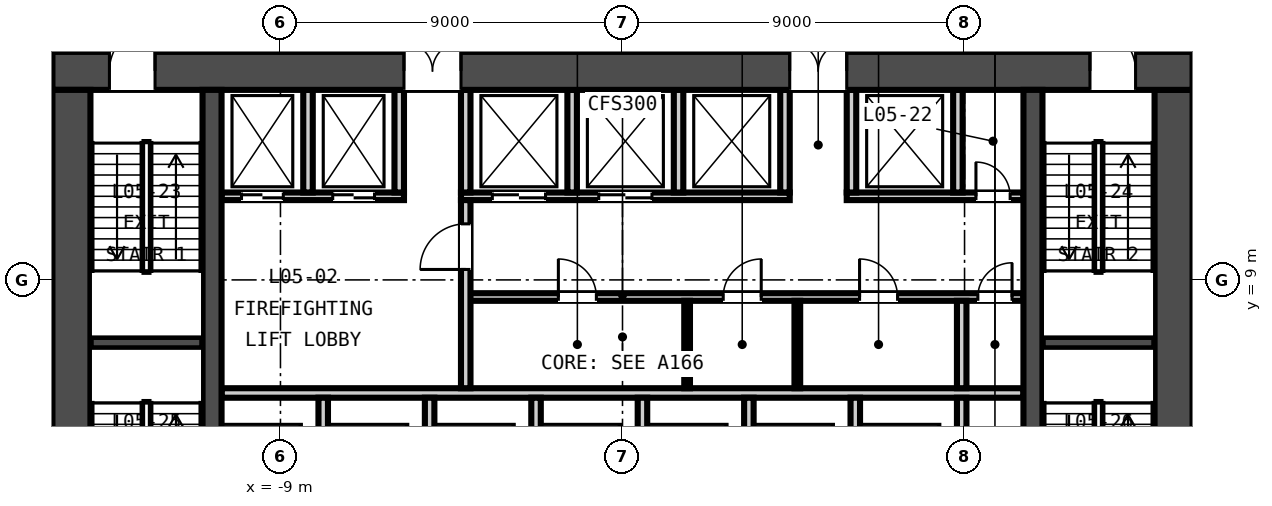
"""IFC4 building model, lengths in metres.
Left out: names, types, materials, properties, quantities, classifications, styles, units other than length and angle.
Written with IfcOpenShell. Run it as: python <this file> out.ifc"""

import sys

from ifc_helpers import new_model, si_unit, direction, frame, frame_2d, origin, place, context, subcontext, project, spatial, rectangle, extrude, element, fill, save


model = new_model("IFC4")
c1 = context("Model", 3, precision=1e-05, world=origin(), true_north=direction((0.0, 1.0)))
c2 = subcontext(c1, "Body", "Model", "MODEL_VIEW")
j1 = project(units=[si_unit("LENGTHUNIT", "METRE"), si_unit("PLANEANGLEUNIT", "RADIAN")], contexts=[c1])
p1 = place(None, origin())
s1 = spatial("IfcSite", under=j1, at=p1, CompositionType="ELEMENT")
p2 = place(p1, origin())
s2 = spatial("IfcBuilding", under=s1, at=p2, CompositionType="ELEMENT")
p3 = place(p2, frame((0.0, 0.0, 31.5)))
s3 = spatial("IfcBuildingStorey", under=s2, at=p3, CompositionType="ELEMENT", Elevation=31.5)
p4 = place(p3, frame((-15.0, 14.5, -0.3), z_axis=(0.0, 0.0, 1.0), x_axis=(1.0, 0.0, 0.0)))
e1 = element("IfcWall", 1, at=p4, inside=s3, PredefinedType="SOLIDWALL", context=c2, shape_type="SweptSolid", body=[
    extrude(rectangle(XDim=30.0, YDim=1.0, at=frame_2d((15.0, 0.0))), origin(), (0.0, 0.0, 1.0), 4.65),
])
p5 = place(p4, frame((9.25, 0.0, 0.3)))
e2 = element("IfcOpeningElement", 2, at=p5, cuts=e1, PredefinedType="OPENING", context=c2, shape_type="SweptSolid", body=[
    extrude(rectangle(XDim=1.5, YDim=2.1, at=frame_2d((0.75, 1.05))), frame((0.0, 0.51, 0.0), z_axis=(0.0, -1.0, 0.0), x_axis=(1.0, 0.0, 0.0)), (0.0, 0.0, 1.0), 1.02),
])
p6 = place(p4, frame((19.4, 0.0, 0.3)))
e3 = element("IfcOpeningElement", 3, at=p6, cuts=e1, PredefinedType="OPENING", context=c2, shape_type="SweptSolid", body=[
    extrude(rectangle(XDim=1.5, YDim=2.1, at=frame_2d((0.75, 1.05))), frame((0.0, 0.51, 0.0), z_axis=(0.0, -1.0, 0.0), x_axis=(1.0, 0.0, 0.0)), (0.0, 0.0, 1.0), 1.02),
])
p7 = place(p4, frame((1.5, 0.0, 0.3)))
e4 = element("IfcOpeningElement", 4, at=p7, cuts=e1, PredefinedType="OPENING", context=c2, shape_type="SweptSolid", body=[
    extrude(rectangle(XDim=1.2, YDim=2.1, at=frame_2d((0.6, 1.05))), frame((0.0, 0.51, 0.0), z_axis=(0.0, -1.0, 0.0), x_axis=(1.0, 0.0, 0.0)), (0.0, 0.0, 1.0), 1.02),
])
p8 = place(p4, frame((27.3, 0.0, 0.3)))
e5 = element("IfcOpeningElement", 5, at=p8, cuts=e1, PredefinedType="OPENING", context=c2, shape_type="SweptSolid", body=[
    extrude(rectangle(XDim=1.2, YDim=2.1, at=frame_2d((0.6, 1.05))), frame((0.0, 0.51, 0.0), z_axis=(0.0, -1.0, 0.0), x_axis=(1.0, 0.0, 0.0)), (0.0, 0.0, 1.0), 1.02),
])
for number, where, z_axis, x_axis in (
    (6, (-14.5, 1.0, -0.3), (0.0, 0.0, 1.0), (0.0, 1.0, 0.0)),
    (7, (14.5, 1.0, -0.3), (0.0, 0.0, 1.0), (0.0, 1.0, 0.0)),
):
    element("IfcWall", number, at=place(p3, frame(where, z_axis=z_axis, x_axis=x_axis)), inside=s3, PredefinedType="SOLIDWALL", context=c2, shape_type="SweptSolid", body=[
        extrude(rectangle(XDim=13.0, YDim=1.0, at=frame_2d((6.5, 0.0))), origin(), (0.0, 0.0, 1.0), 4.65),
    ])
for number, where, z_axis, x_axis in (
    (8, (-10.8, 1.0, -0.3), (0.0, 0.0, 1.0), (0.0, 1.0, 0.0)),
    (9, (10.8, 1.0, -0.3), (0.0, 0.0, 1.0), (0.0, 1.0, 0.0)),
):
    element("IfcWall", number, at=place(p3, frame(where, z_axis=z_axis, x_axis=x_axis)), inside=s3, PredefinedType="SOLIDWALL", context=c2, shape_type="SweptSolid", body=[
        extrude(rectangle(XDim=13.0, YDim=0.5, at=frame_2d((6.5, 0.0))), origin(), (0.0, 0.0, 1.0), 4.65),
    ])
p9 = place(p3, frame((-10.55, 6.025, 0.0), z_axis=(0.0, 0.0, 1.0), x_axis=(1.0, 0.0, 0.0)))
e10 = element("IfcWall", 10, at=p9, inside=s3, PredefinedType="PARTITIONING", context=c2, shape_type="SweptSolid", body=[
    extrude(rectangle(XDim=21.1, YDim=0.25, at=frame_2d((10.55, 0.0))), origin(), (0.0, 0.0, 1.0), 4.35),
])
p10 = place(p3, frame((-4.125, 8.55, 0.0), z_axis=(0.0, 0.0, 1.0), x_axis=(1.0, 0.0, 0.0)))
e11 = element("IfcWall", 11, at=p10, inside=s3, PredefinedType="PARTITIONING", context=c2, shape_type="SweptSolid", body=[
    extrude(rectangle(XDim=14.675, YDim=0.2, at=frame_2d((7.337, 0.0))), origin(), (0.0, 0.0, 1.0), 4.35),
])
p11 = place(p10, frame((2.438, 0.0, 0.0)))
e12 = element("IfcOpeningElement", 12, at=p11, cuts=e11, PredefinedType="OPENING", context=c2, shape_type="SweptSolid", body=[
    extrude(rectangle(XDim=1.0, YDim=2.1, at=frame_2d((0.5, 1.05))), frame((0.0, 0.11, 0.0), z_axis=(0.0, -1.0, 0.0), x_axis=(1.0, 0.0, 0.0)), (0.0, 0.0, 1.0), 0.22),
])
p12 = place(p10, frame((6.775, 0.0, 0.0)))
e13 = element("IfcOpeningElement", 13, at=p12, cuts=e11, PredefinedType="OPENING", context=c2, shape_type="SweptSolid", body=[
    extrude(rectangle(XDim=1.0, YDim=2.1, at=frame_2d((0.5, 1.05))), frame((0.0, 0.11, 0.0), z_axis=(0.0, -1.0, 0.0), x_axis=(1.0, 0.0, 0.0)), (0.0, 0.0, 1.0), 0.22),
])
p13 = place(p10, frame((10.363, 0.0, 0.0)))
e14 = element("IfcOpeningElement", 14, at=p13, cuts=e11, PredefinedType="OPENING", context=c2, shape_type="SweptSolid", body=[
    extrude(rectangle(XDim=1.0, YDim=2.1, at=frame_2d((0.5, 1.05))), frame((0.0, 0.11, 0.0), z_axis=(0.0, -1.0, 0.0), x_axis=(1.0, 0.0, 0.0)), (0.0, 0.0, 1.0), 0.22),
])
p14 = place(p10, frame((13.475, 0.0, 0.0)))
e15 = element("IfcOpeningElement", 15, at=p14, cuts=e11, PredefinedType="OPENING", context=c2, shape_type="SweptSolid", body=[
    extrude(rectangle(XDim=0.9, YDim=2.1, at=frame_2d((0.45, 1.05))), frame((0.0, 0.11, 0.0), z_axis=(0.0, -1.0, 0.0), x_axis=(1.0, 0.0, 0.0)), (0.0, 0.0, 1.0), 0.22),
])
p15 = place(p3, frame((-10.55, 11.2, 0.0), z_axis=(0.0, 0.0, 1.0), x_axis=(1.0, 0.0, 0.0)))
e16 = element("IfcWall", 16, at=p15, inside=s3, PredefinedType="PARTITIONING", context=c2, shape_type="SweptSolid", body=[
    extrude(rectangle(XDim=4.8, YDim=0.2, at=frame_2d((2.4, 0.0))), origin(), (0.0, 0.0, 1.0), 4.35),
])
p16 = place(p15, frame((0.525, 0.0, 0.0)))
e17 = element("IfcOpeningElement", 17, at=p16, cuts=e16, PredefinedType="OPENING", context=c2, shape_type="SweptSolid", body=[
    extrude(rectangle(XDim=1.1, YDim=2.1, at=frame_2d((0.55, 1.05))), frame((0.0, 0.11, 0.0), z_axis=(0.0, -1.0, 0.0), x_axis=(1.0, 0.0, 0.0)), (0.0, 0.0, 1.0), 0.22),
])
p17 = place(p15, frame((2.925, 0.0, 0.0)))
e18 = element("IfcOpeningElement", 18, at=p17, cuts=e16, PredefinedType="OPENING", context=c2, shape_type="SweptSolid", body=[
    extrude(rectangle(XDim=1.1, YDim=2.1, at=frame_2d((0.55, 1.05))), frame((0.0, 0.11, 0.0), z_axis=(0.0, -1.0, 0.0), x_axis=(1.0, 0.0, 0.0)), (0.0, 0.0, 1.0), 0.22),
])
p18 = place(p3, frame((-4.25, 11.2, 0.0), z_axis=(0.0, 0.0, 1.0), x_axis=(1.0, 0.0, 0.0)))
e19 = element("IfcWall", 19, at=p18, inside=s3, PredefinedType="PARTITIONING", context=c2, shape_type="SweptSolid", body=[
    extrude(rectangle(XDim=8.65, YDim=0.2, at=frame_2d((4.325, 0.0))), origin(), (0.0, 0.0, 1.0), 4.35),
])
p19 = place(p18, frame((0.825, 0.0, 0.0)))
e20 = element("IfcOpeningElement", 20, at=p19, cuts=e19, PredefinedType="OPENING", context=c2, shape_type="SweptSolid", body=[
    extrude(rectangle(XDim=1.4, YDim=2.1, at=frame_2d((0.7, 1.05))), frame((0.0, 0.11, 0.0), z_axis=(0.0, -1.0, 0.0), x_axis=(1.0, 0.0, 0.0)), (0.0, 0.0, 1.0), 0.22),
])
p20 = place(p18, frame((3.625, 0.0, 0.0)))
e21 = element("IfcOpeningElement", 21, at=p20, cuts=e19, PredefinedType="OPENING", context=c2, shape_type="SweptSolid", body=[
    extrude(rectangle(XDim=1.4, YDim=2.1, at=frame_2d((0.7, 1.05))), frame((0.0, 0.11, 0.0), z_axis=(0.0, -1.0, 0.0), x_axis=(1.0, 0.0, 0.0)), (0.0, 0.0, 1.0), 0.22),
])
p21 = place(p3, frame((5.9, 11.2, 0.0), z_axis=(0.0, 0.0, 1.0), x_axis=(1.0, 0.0, 0.0)))
e22 = element("IfcWall", 22, at=p21, inside=s3, PredefinedType="PARTITIONING", context=c2, shape_type="SweptSolid", body=[
    extrude(rectangle(XDim=4.65, YDim=0.2, at=frame_2d((2.325, 0.0))), origin(), (0.0, 0.0, 1.0), 4.35),
])
p22 = place(p21, frame((3.4, 0.0, 0.0)))
e23 = element("IfcOpeningElement", 23, at=p22, cuts=e22, PredefinedType="OPENING", context=c2, shape_type="SweptSolid", body=[
    extrude(rectangle(XDim=0.9, YDim=2.1, at=frame_2d((0.45, 1.05))), frame((0.0, 0.11, 0.0), z_axis=(0.0, -1.0, 0.0), x_axis=(1.0, 0.0, 0.0)), (0.0, 0.0, 1.0), 0.22),
])
p23 = place(p3, frame((-4.125, 6.15, 0.0), z_axis=(0.0, 0.0, 1.0), x_axis=(0.0, 1.0, 0.0)))
e24 = element("IfcWall", 24, at=p23, inside=s3, PredefinedType="PARTITIONING", context=c2, shape_type="SweptSolid", body=[
    extrude(rectangle(XDim=4.95, YDim=0.25, at=frame_2d((2.475, 0.0))), origin(), (0.0, 0.0, 1.0), 4.35),
])
p24 = place(p23, frame((3.125, 0.0, 0.0)))
e25 = element("IfcOpeningElement", 25, at=p24, cuts=e24, PredefinedType="OPENING", context=c2, shape_type="SweptSolid", body=[
    extrude(rectangle(XDim=1.2, YDim=2.1, at=frame_2d((0.6, 1.05))), frame((0.0, 0.135, 0.0), z_axis=(0.0, -1.0, 0.0), x_axis=(1.0, 0.0, 0.0)), (0.0, 0.0, 1.0), 0.27),
])
for number, where, z_axis, x_axis in (
    (26, (-7.875, 3.6, 0.0), (0.0, 0.0, 1.0), (0.0, 1.0, 0.0)),
    (27, (-5.075, 3.6, 0.0), (0.0, 0.0, 1.0), (0.0, 1.0, 0.0)),
    (28, (-2.275, 3.6, 0.0), (0.0, 0.0, 1.0), (0.0, 1.0, 0.0)),
    (29, (0.525, 3.6, 0.0), (0.0, 0.0, 1.0), (0.0, 1.0, 0.0)),
    (30, (3.325, 3.6, 0.0), (0.0, 0.0, 1.0), (0.0, 1.0, 0.0)),
    (31, (6.125, 3.6, 0.0), (0.0, 0.0, 1.0), (0.0, 1.0, 0.0)),
    (32, (8.925, 3.6, 0.0), (0.0, 0.0, 1.0), (0.0, 1.0, 0.0)),
):
    element("IfcWall", number, at=place(p3, frame(where, z_axis=z_axis, x_axis=x_axis)), inside=s3, PredefinedType="PARTITIONING", context=c2, shape_type="SweptSolid", body=[
        extrude(rectangle(XDim=2.3, YDim=0.25, at=frame_2d((1.15, 0.0))), origin(), (0.0, 0.0, 1.0), 4.35),
    ])
for number, where, z_axis, x_axis in (
    (33, (1.7, 6.15, 0.0), (0.0, 0.0, 1.0), (0.0, 1.0, 0.0)),
    (34, (4.6, 6.15, 0.0), (0.0, 0.0, 1.0), (0.0, 1.0, 0.0)),
):
    element("IfcWall", number, at=place(p3, frame(where, z_axis=z_axis, x_axis=x_axis)), inside=s3, PredefinedType="PARTITIONING", context=c2, shape_type="SweptSolid", body=[
        extrude(rectangle(XDim=2.3, YDim=0.15, at=frame_2d((1.15, 0.0))), origin(), (0.0, 0.0, 1.0), 4.35),
    ])
p25 = place(p3, frame((8.925, 6.15, 0.0), z_axis=(0.0, 0.0, 1.0), x_axis=(0.0, 1.0, 0.0)))
e35 = element("IfcWall", 35, at=p25, inside=s3, PredefinedType="PARTITIONING", context=c2, shape_type="SweptSolid", body=[
    extrude(rectangle(XDim=2.3, YDim=0.25, at=frame_2d((1.15, 0.0))), origin(), (0.0, 0.0, 1.0), 4.35),
])
for number, where, z_axis, x_axis in (
    (36, (-8.275, 11.3, 0.0), (0.0, 0.0, 1.0), (0.0, 1.0, 0.0)),
    (37, (-5.875, 11.3, 0.0), (0.0, 0.0, 1.0), (0.0, 1.0, 0.0)),
    (38, (-4.125, 11.3, 0.0), (0.0, 0.0, 1.0), (0.0, 1.0, 0.0)),
    (39, (-1.325, 11.3, 0.0), (0.0, 0.0, 1.0), (0.0, 1.0, 0.0)),
    (40, (1.475, 11.3, 0.0), (0.0, 0.0, 1.0), (0.0, 1.0, 0.0)),
    (41, (4.275, 11.3, 0.0), (0.0, 0.0, 1.0), (0.0, 1.0, 0.0)),
    (42, (6.025, 11.3, 0.0), (0.0, 0.0, 1.0), (0.0, 1.0, 0.0)),
    (43, (8.825, 11.3, 0.0), (0.0, 0.0, 1.0), (0.0, 1.0, 0.0)),
):
    element("IfcWall", number, at=place(p3, frame(where, z_axis=z_axis, x_axis=x_axis)), inside=s3, PredefinedType="PARTITIONING", context=c2, shape_type="SweptSolid", body=[
        extrude(rectangle(XDim=2.7, YDim=0.25, at=frame_2d((1.35, 0.0))), origin(), (0.0, 0.0, 1.0), 4.35),
    ])
for number, where, z_axis, x_axis in (
    (44, (-14.0, 7.35, -0.3), (0.0, 0.0, 1.0), (1.0, 0.0, 0.0)),
    (45, (11.05, 7.35, -0.3), (0.0, 0.0, 1.0), (1.0, 0.0, 0.0)),
):
    element("IfcWall", number, at=place(p3, frame(where, z_axis=z_axis, x_axis=x_axis)), inside=s3, PredefinedType="SOLIDWALL", context=c2, shape_type="SweptSolid", body=[
        extrude(rectangle(XDim=2.95, YDim=0.3, at=frame_2d((1.475, 0.0))), origin(), (0.0, 0.0, 1.0), 4.65),
    ])
p26 = place(p24, origin())
e46 = element("IfcDoor", 46, at=p26, inside=s3, OperationType="SINGLE_SWING_LEFT", PredefinedType="DOOR", context=c2, shape_type="SweptSolid", body=[
    extrude(rectangle(XDim=1.2, YDim=2.1, at=frame_2d((0.6, 1.05))), frame((0.0, 0.025, 0.0), z_axis=(0.0, -1.0, 0.0), x_axis=(1.0, 0.0, 0.0)), (0.0, 0.0, 1.0), 0.05),
])
fill(e25, e46)
p27 = place(p11, origin())
e47 = element("IfcDoor", 47, at=p27, inside=s3, OperationType="SINGLE_SWING_LEFT", PredefinedType="DOOR", context=c2, shape_type="SweptSolid", body=[
    extrude(rectangle(XDim=1.0, YDim=2.1, at=frame_2d((0.5, 1.05))), frame((0.0, 0.025, 0.0), z_axis=(0.0, -1.0, 0.0), x_axis=(1.0, 0.0, 0.0)), (0.0, 0.0, 1.0), 0.05),
])
fill(e12, e47)
p28 = place(p12, origin())
e48 = element("IfcDoor", 48, at=p28, inside=s3, OperationType="SINGLE_SWING_RIGHT", PredefinedType="DOOR", context=c2, shape_type="SweptSolid", body=[
    extrude(rectangle(XDim=1.0, YDim=2.1, at=frame_2d((0.5, 1.05))), frame((0.0, 0.025, 0.0), z_axis=(0.0, -1.0, 0.0), x_axis=(1.0, 0.0, 0.0)), (0.0, 0.0, 1.0), 0.05),
])
fill(e13, e48)
p29 = place(p13, origin())
e49 = element("IfcDoor", 49, at=p29, inside=s3, OperationType="SINGLE_SWING_LEFT", PredefinedType="DOOR", context=c2, shape_type="SweptSolid", body=[
    extrude(rectangle(XDim=1.0, YDim=2.1, at=frame_2d((0.5, 1.05))), frame((0.0, 0.025, 0.0), z_axis=(0.0, -1.0, 0.0), x_axis=(1.0, 0.0, 0.0)), (0.0, 0.0, 1.0), 0.05),
])
fill(e14, e49)
p30 = place(p14, origin())
e50 = element("IfcDoor", 50, at=p30, inside=s3, OperationType="SINGLE_SWING_RIGHT", PredefinedType="DOOR", context=c2, shape_type="SweptSolid", body=[
    extrude(rectangle(XDim=0.9, YDim=2.1, at=frame_2d((0.45, 1.05))), frame((0.0, 0.025, 0.0), z_axis=(0.0, -1.0, 0.0), x_axis=(1.0, 0.0, 0.0)), (0.0, 0.0, 1.0), 0.05),
])
fill(e15, e50)
p31 = place(p16, origin())
e51 = element("IfcDoor", 51, at=p31, inside=s3, OperationType="DOUBLE_DOOR_SLIDING", PredefinedType="DOOR", context=c2, shape_type="SweptSolid", body=[
    extrude(rectangle(XDim=1.1, YDim=2.1, at=frame_2d((0.55, 1.05))), frame((0.0, 0.025, 0.0), z_axis=(0.0, -1.0, 0.0), x_axis=(1.0, 0.0, 0.0)), (0.0, 0.0, 1.0), 0.05),
])
fill(e17, e51)
p32 = place(p17, origin())
e52 = element("IfcDoor", 52, at=p32, inside=s3, OperationType="DOUBLE_DOOR_SLIDING", PredefinedType="DOOR", context=c2, shape_type="SweptSolid", body=[
    extrude(rectangle(XDim=1.1, YDim=2.1, at=frame_2d((0.55, 1.05))), frame((0.0, 0.025, 0.0), z_axis=(0.0, -1.0, 0.0), x_axis=(1.0, 0.0, 0.0)), (0.0, 0.0, 1.0), 0.05),
])
fill(e18, e52)
p33 = place(p19, origin())
e53 = element("IfcDoor", 53, at=p33, inside=s3, OperationType="DOUBLE_DOOR_SLIDING", PredefinedType="DOOR", context=c2, shape_type="SweptSolid", body=[
    extrude(rectangle(XDim=1.4, YDim=2.1, at=frame_2d((0.7, 1.05))), frame((0.0, 0.025, 0.0), z_axis=(0.0, -1.0, 0.0), x_axis=(1.0, 0.0, 0.0)), (0.0, 0.0, 1.0), 0.05),
])
fill(e20, e53)
p34 = place(p20, origin())
e54 = element("IfcDoor", 54, at=p34, inside=s3, OperationType="DOUBLE_DOOR_SLIDING", PredefinedType="DOOR", context=c2, shape_type="SweptSolid", body=[
    extrude(rectangle(XDim=1.4, YDim=2.1, at=frame_2d((0.7, 1.05))), frame((0.0, 0.025, 0.0), z_axis=(0.0, -1.0, 0.0), x_axis=(1.0, 0.0, 0.0)), (0.0, 0.0, 1.0), 0.05),
])
fill(e21, e54)
p35 = place(p22, origin())
e55 = element("IfcDoor", 55, at=p35, inside=s3, OperationType="SINGLE_SWING_LEFT", PredefinedType="DOOR", context=c2, shape_type="SweptSolid", body=[
    extrude(rectangle(XDim=0.9, YDim=2.1, at=frame_2d((0.45, 1.05))), frame((0.0, 0.025, 0.0), z_axis=(0.0, -1.0, 0.0), x_axis=(1.0, 0.0, 0.0)), (0.0, 0.0, 1.0), 0.05),
])
fill(e23, e55)
p36 = place(p5, origin())
e56 = element("IfcDoor", 56, at=p36, inside=s3, OperationType="DOUBLE_DOOR_SINGLE_SWING", PredefinedType="DOOR", context=c2, shape_type="SweptSolid", body=[
    extrude(rectangle(XDim=1.5, YDim=2.1, at=frame_2d((0.75, 1.05))), frame((0.0, 0.025, 0.0), z_axis=(0.0, -1.0, 0.0), x_axis=(1.0, 0.0, 0.0)), (0.0, 0.0, 1.0), 0.05),
])
fill(e2, e56)
p37 = place(p6, origin())
e57 = element("IfcDoor", 57, at=p37, inside=s3, OperationType="DOUBLE_DOOR_SINGLE_SWING", PredefinedType="DOOR", context=c2, shape_type="SweptSolid", body=[
    extrude(rectangle(XDim=1.5, YDim=2.1, at=frame_2d((0.75, 1.05))), frame((0.0, 0.025, 0.0), z_axis=(0.0, -1.0, 0.0), x_axis=(1.0, 0.0, 0.0)), (0.0, 0.0, 1.0), 0.05),
])
fill(e3, e57)
p38 = place(p7, origin())
e58 = element("IfcDoor", 58, at=p38, inside=s3, OperationType="SINGLE_SWING_RIGHT", PredefinedType="DOOR", context=c2, shape_type="SweptSolid", body=[
    extrude(rectangle(XDim=1.2, YDim=2.1, at=frame_2d((0.6, 1.05))), frame((0.0, 0.025, 0.0), z_axis=(0.0, -1.0, 0.0), x_axis=(1.0, 0.0, 0.0)), (0.0, 0.0, 1.0), 0.05),
])
fill(e4, e58)
p39 = place(p8, origin())
e59 = element("IfcDoor", 59, at=p39, inside=s3, OperationType="SINGLE_SWING_LEFT", PredefinedType="DOOR", context=c2, shape_type="SweptSolid", body=[
    extrude(rectangle(XDim=1.2, YDim=2.1, at=frame_2d((0.6, 1.05))), frame((0.0, 0.025, 0.0), z_axis=(0.0, -1.0, 0.0), x_axis=(1.0, 0.0, 0.0)), (0.0, 0.0, 1.0), 0.05),
])
fill(e5, e59)
save(model, sys.argv[1])
